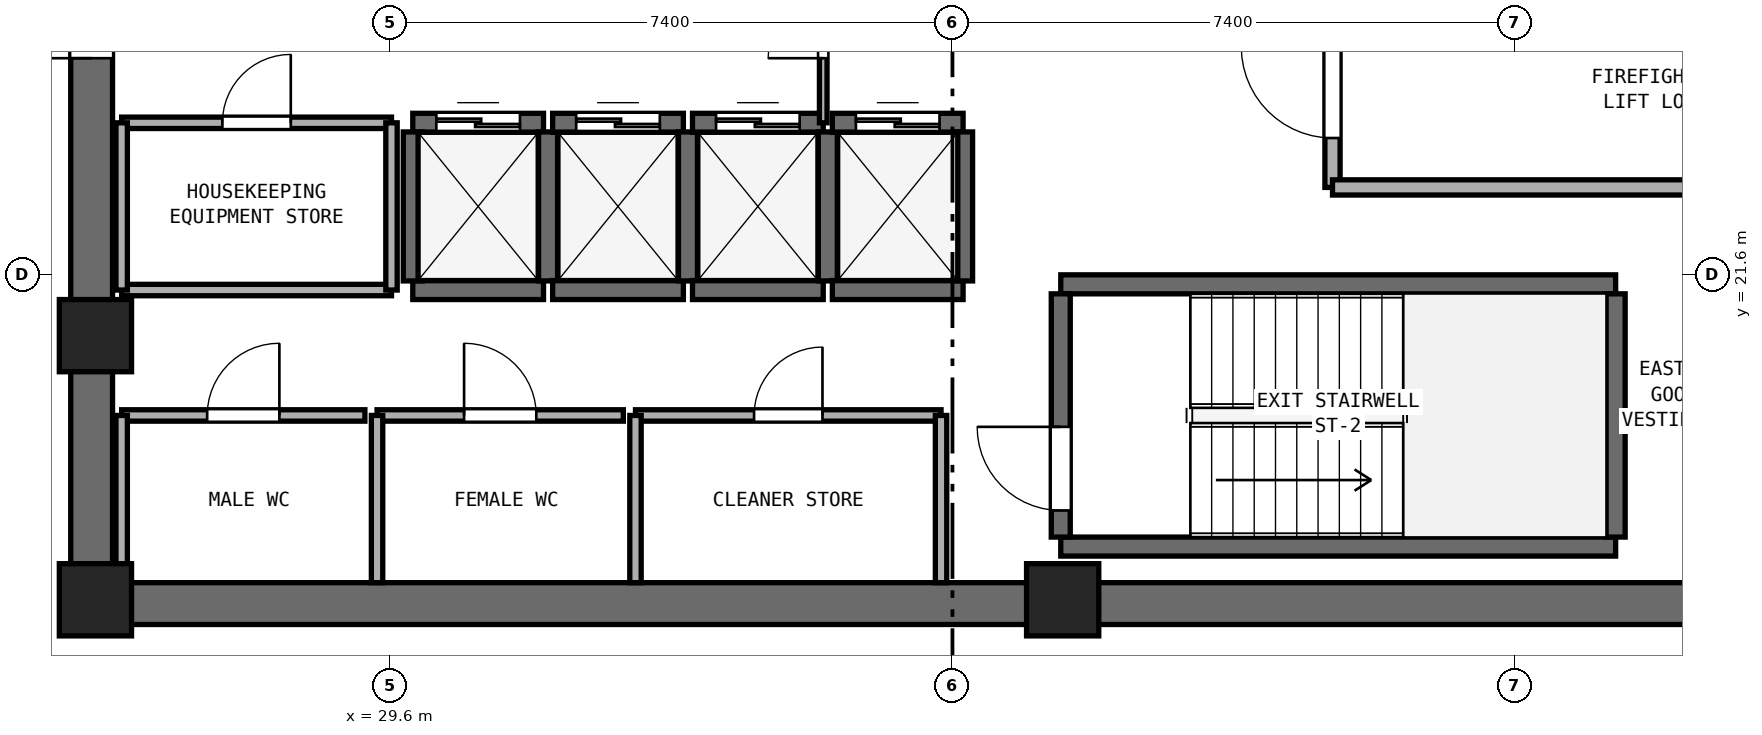
"""IFC4 building model, lengths in metres.
Left out: names, types, materials, properties, quantities, classifications, styles, units other than length and angle.
Written with IfcOpenShell. Run it as: python <this file> out.ifc"""

import sys

from ifc_helpers import new_model, si_unit, direction, frame, frame_2d, origin, origin_2d, place, context, subcontext, project, spatial, rectangle, extrude, element, fill, save


model = new_model("IFC4")
c1 = context("Model", 3, precision=1e-05, world=origin(), true_north=direction((0.0, 1.0)))
c2 = subcontext(c1, "Body", "Model", "MODEL_VIEW")
j1 = project(units=[si_unit("LENGTHUNIT", "METRE"), si_unit("PLANEANGLEUNIT", "RADIAN")], contexts=[c1])
p1 = place(None, origin())
s1 = spatial("IfcSite", under=j1, at=p1, CompositionType="ELEMENT")
p2 = place(p1, origin())
s2 = spatial("IfcBuilding", under=s1, at=p2, CompositionType="ELEMENT")
p3 = place(p2, frame((0.0, 0.0, 144.0)))
s3 = spatial("IfcBuildingStorey", under=s2, at=p3, CompositionType="ELEMENT", Elevation=144.0)
p4 = place(p3, frame((25.4, 17.275, 0.0), z_axis=(0.0, 0.0, 1.0), x_axis=(1.0, 0.0, 0.0)))
e1 = element("IfcWall", 1, at=p4, inside=s3, PredefinedType="SHEAR", context=c2, shape_type="SweptSolid", body=[
    extrude(rectangle(XDim=23.2, YDim=0.55, at=frame_2d((11.6, 0.0))), origin(), (0.0, 0.0, 1.0), 3.54),
])
p5 = place(p3, frame((25.675, 17.55, 0.0), z_axis=(0.0, 0.0, 1.0), x_axis=(0.0, 1.0, 0.0)))
e2 = element("IfcWall", 2, at=p5, inside=s3, PredefinedType="SHEAR", context=c2, shape_type="SweptSolid", body=[
    extrude(rectangle(XDim=15.3, YDim=0.55, at=frame_2d((7.65, 0.0))), origin(), (0.0, 0.0, 1.0), 3.54),
])
p6 = place(p5, frame((6.9, 0.0, 0.0)))
e3 = element("IfcOpeningElement", 3, at=p6, cuts=e2, PredefinedType="OPENING", context=c2, shape_type="SweptSolid", body=[
    extrude(rectangle(XDim=1.5, YDim=2.15, at=frame_2d((0.75, 1.075))), frame((0.0, 0.285, 0.0), z_axis=(0.0, -1.0, 0.0), x_axis=(1.0, 0.0, 0.0)), (0.0, 0.0, 1.0), 0.57),
])
for number, where, z_axis, x_axis in (
    (4, (25.725, 17.325, 0.0), (0.0, 0.0, 1.0), (1.0, 0.0, 0.0)),
    (5, (38.45, 17.325, 0.0), (0.0, 0.0, 1.0), (1.0, 0.0, 0.0)),
    (6, (25.725, 20.8, 0.0), (0.0, 0.0, 1.0), (1.0, 0.0, 0.0)),
):
    element("IfcColumn", number, at=place(p3, frame(where, z_axis=z_axis, x_axis=x_axis)), inside=s3, PredefinedType="PILASTER", context=c2, shape_type="SweptSolid", body=[
        extrude(rectangle(XDim=0.95, YDim=0.95, at=origin_2d()), origin(), (0.0, 0.0, 1.0), 3.8),
    ])
for number, where, z_axis, x_axis in (
    (7, (38.425, 18.025, 0.0), (0.0, 0.0, 1.0), (1.0, 0.0, 0.0)),
    (8, (38.425, 21.475, 0.0), (0.0, 0.0, 1.0), (1.0, 0.0, 0.0)),
):
    element("IfcWall", number, at=place(p3, frame(where, z_axis=z_axis, x_axis=x_axis)), inside=s3, PredefinedType="SHEAR", context=c2, shape_type="SweptSolid", body=[
        extrude(rectangle(XDim=7.3, YDim=0.25, at=frame_2d((3.65, 0.0))), origin(), (0.0, 0.0, 1.0), 3.54),
    ])
p7 = place(p3, frame((38.425, 18.15, 0.0), z_axis=(0.0, 0.0, 1.0), x_axis=(0.0, 1.0, 0.0)))
e9 = element("IfcWall", 9, at=p7, inside=s3, PredefinedType="SHEAR", context=c2, shape_type="SweptSolid", body=[
    extrude(rectangle(XDim=3.2, YDim=0.25, at=frame_2d((1.6, 0.0))), origin(), (0.0, 0.0, 1.0), 3.54),
])
p8 = place(p7, frame((0.35, 0.0, 0.0)))
e10 = element("IfcOpeningElement", 10, at=p8, cuts=e9, PredefinedType="OPENING", context=c2, shape_type="SweptSolid", body=[
    extrude(rectangle(XDim=1.1, YDim=2.15, at=frame_2d((0.55, 1.075))), frame((0.0, 0.135, 0.0), z_axis=(0.0, -1.0, 0.0), x_axis=(1.0, 0.0, 0.0)), (0.0, 0.0, 1.0), 0.27),
])
p9 = place(p3, frame((45.725, 18.15, 0.0), z_axis=(0.0, 0.0, 1.0), x_axis=(0.0, 1.0, 0.0)))
e11 = element("IfcWall", 11, at=p9, inside=s3, PredefinedType="SHEAR", context=c2, shape_type="SweptSolid", body=[
    extrude(rectangle(XDim=3.2, YDim=0.25, at=frame_2d((1.6, 0.0))), origin(), (0.0, 0.0, 1.0), 3.54),
])
p10 = place(p3, frame((29.9, 21.4, 0.0), z_axis=(0.0, 0.0, 1.0), x_axis=(1.0, 0.0, 0.0)))
e12 = element("IfcWall", 12, at=p10, inside=s3, PredefinedType="SHEAR", context=c2, shape_type="SweptSolid", body=[
    extrude(rectangle(XDim=1.72, YDim=0.25, at=frame_2d((0.86, 0.0))), origin(), (0.0, 0.0, 1.0), 3.54),
])
p11 = place(p3, frame((29.9, 23.6, 0.0), z_axis=(0.0, 0.0, 1.0), x_axis=(1.0, 0.0, 0.0)))
e13 = element("IfcWall", 13, at=p11, inside=s3, PredefinedType="SHEAR", context=c2, shape_type="SweptSolid", body=[
    extrude(rectangle(XDim=1.72, YDim=0.25, at=frame_2d((0.86, 0.0))), origin(), (0.0, 0.0, 1.0), 3.54),
])
p12 = place(p11, frame((0.31, 0.0, 0.0)))
e14 = element("IfcOpeningElement", 14, at=p12, cuts=e13, PredefinedType="OPENING", context=c2, shape_type="SweptSolid", body=[
    extrude(rectangle(XDim=1.1, YDim=2.15, at=frame_2d((0.55, 1.075))), frame((0.0, 0.135, 0.0), z_axis=(0.0, -1.0, 0.0), x_axis=(1.0, 0.0, 0.0)), (0.0, 0.0, 1.0), 0.27),
])
for number, where, z_axis, x_axis in (
    (15, (29.9, 21.52, 0.0), (0.0, 0.0, 1.0), (0.0, 1.0, 0.0)),
    (16, (31.68, 21.52, 0.0), (0.0, 0.0, 1.0), (0.0, 1.0, 0.0)),
):
    element("IfcWall", number, at=place(p3, frame(where, z_axis=z_axis, x_axis=x_axis)), inside=s3, PredefinedType="SHEAR", context=c2, shape_type="SweptSolid", body=[
        extrude(rectangle(XDim=1.96, YDim=0.25, at=frame_2d((0.98, 0.0))), origin(), (0.0, 0.0, 1.0), 3.54),
    ])
p13 = place(p3, frame((31.74, 21.4, 0.0), z_axis=(0.0, 0.0, 1.0), x_axis=(1.0, 0.0, 0.0)))
e17 = element("IfcWall", 17, at=p13, inside=s3, PredefinedType="SHEAR", context=c2, shape_type="SweptSolid", body=[
    extrude(rectangle(XDim=1.72, YDim=0.25, at=frame_2d((0.86, 0.0))), origin(), (0.0, 0.0, 1.0), 3.54),
])
p14 = place(p3, frame((31.74, 23.6, 0.0), z_axis=(0.0, 0.0, 1.0), x_axis=(1.0, 0.0, 0.0)))
e18 = element("IfcWall", 18, at=p14, inside=s3, PredefinedType="SHEAR", context=c2, shape_type="SweptSolid", body=[
    extrude(rectangle(XDim=1.72, YDim=0.25, at=frame_2d((0.86, 0.0))), origin(), (0.0, 0.0, 1.0), 3.54),
])
p15 = place(p14, frame((0.31, 0.0, 0.0)))
e19 = element("IfcOpeningElement", 19, at=p15, cuts=e18, PredefinedType="OPENING", context=c2, shape_type="SweptSolid", body=[
    extrude(rectangle(XDim=1.1, YDim=2.15, at=frame_2d((0.55, 1.075))), frame((0.0, 0.135, 0.0), z_axis=(0.0, -1.0, 0.0), x_axis=(1.0, 0.0, 0.0)), (0.0, 0.0, 1.0), 0.27),
])
p16 = place(p3, frame((33.52, 21.52, 0.0), z_axis=(0.0, 0.0, 1.0), x_axis=(0.0, 1.0, 0.0)))
e20 = element("IfcWall", 20, at=p16, inside=s3, PredefinedType="SHEAR", context=c2, shape_type="SweptSolid", body=[
    extrude(rectangle(XDim=1.96, YDim=0.25, at=frame_2d((0.98, 0.0))), origin(), (0.0, 0.0, 1.0), 3.54),
])
p17 = place(p3, frame((33.58, 21.4, 0.0), z_axis=(0.0, 0.0, 1.0), x_axis=(1.0, 0.0, 0.0)))
e21 = element("IfcWall", 21, at=p17, inside=s3, PredefinedType="SHEAR", context=c2, shape_type="SweptSolid", body=[
    extrude(rectangle(XDim=1.72, YDim=0.25, at=frame_2d((0.86, 0.0))), origin(), (0.0, 0.0, 1.0), 3.54),
])
p18 = place(p3, frame((33.58, 23.6, 0.0), z_axis=(0.0, 0.0, 1.0), x_axis=(1.0, 0.0, 0.0)))
e22 = element("IfcWall", 22, at=p18, inside=s3, PredefinedType="SHEAR", context=c2, shape_type="SweptSolid", body=[
    extrude(rectangle(XDim=1.72, YDim=0.25, at=frame_2d((0.86, 0.0))), origin(), (0.0, 0.0, 1.0), 3.54),
])
p19 = place(p18, frame((0.31, 0.0, 0.0)))
e23 = element("IfcOpeningElement", 23, at=p19, cuts=e22, PredefinedType="OPENING", context=c2, shape_type="SweptSolid", body=[
    extrude(rectangle(XDim=1.1, YDim=2.15, at=frame_2d((0.55, 1.075))), frame((0.0, 0.135, 0.0), z_axis=(0.0, -1.0, 0.0), x_axis=(1.0, 0.0, 0.0)), (0.0, 0.0, 1.0), 0.27),
])
p20 = place(p3, frame((35.36, 21.52, 0.0), z_axis=(0.0, 0.0, 1.0), x_axis=(0.0, 1.0, 0.0)))
e24 = element("IfcWall", 24, at=p20, inside=s3, PredefinedType="SHEAR", context=c2, shape_type="SweptSolid", body=[
    extrude(rectangle(XDim=1.96, YDim=0.25, at=frame_2d((0.98, 0.0))), origin(), (0.0, 0.0, 1.0), 3.54),
])
p21 = place(p3, frame((35.42, 21.4, 0.0), z_axis=(0.0, 0.0, 1.0), x_axis=(1.0, 0.0, 0.0)))
e25 = element("IfcWall", 25, at=p21, inside=s3, PredefinedType="SHEAR", context=c2, shape_type="SweptSolid", body=[
    extrude(rectangle(XDim=1.72, YDim=0.25, at=frame_2d((0.86, 0.0))), origin(), (0.0, 0.0, 1.0), 3.54),
])
p22 = place(p3, frame((35.42, 23.6, 0.0), z_axis=(0.0, 0.0, 1.0), x_axis=(1.0, 0.0, 0.0)))
e26 = element("IfcWall", 26, at=p22, inside=s3, PredefinedType="SHEAR", context=c2, shape_type="SweptSolid", body=[
    extrude(rectangle(XDim=1.72, YDim=0.25, at=frame_2d((0.86, 0.0))), origin(), (0.0, 0.0, 1.0), 3.54),
])
p23 = place(p22, frame((0.31, 0.0, 0.0)))
e27 = element("IfcOpeningElement", 27, at=p23, cuts=e26, PredefinedType="OPENING", context=c2, shape_type="SweptSolid", body=[
    extrude(rectangle(XDim=1.1, YDim=2.15, at=frame_2d((0.55, 1.075))), frame((0.0, 0.135, 0.0), z_axis=(0.0, -1.0, 0.0), x_axis=(1.0, 0.0, 0.0)), (0.0, 0.0, 1.0), 0.27),
])
p24 = place(p3, frame((37.14, 21.52, 0.0), z_axis=(0.0, 0.0, 1.0), x_axis=(0.0, 1.0, 0.0)))
e28 = element("IfcWall", 28, at=p24, inside=s3, PredefinedType="SHEAR", context=c2, shape_type="SweptSolid", body=[
    extrude(rectangle(XDim=1.96, YDim=0.25, at=frame_2d((0.98, 0.0))), origin(), (0.0, 0.0, 1.0), 3.54),
])
p25 = place(p3, frame((42.0, 22.75, 0.0), z_axis=(0.0, 0.0, 1.0), x_axis=(0.0, 1.0, 0.0)))
e29 = element("IfcWall", 29, at=p25, inside=s3, PredefinedType="SOLIDWALL", context=c2, shape_type="SweptSolid", body=[
    extrude(rectangle(XDim=6.05, YDim=0.2, at=frame_2d((3.025, 0.0))), origin(), (0.0, 0.0, 1.0), 3.54),
])
p26 = place(p25, frame((0.65, 0.0, 0.0)))
e30 = element("IfcOpeningElement", 30, at=p26, cuts=e29, PredefinedType="OPENING", context=c2, shape_type="SweptSolid", body=[
    extrude(rectangle(XDim=1.2, YDim=2.15, at=frame_2d((0.6, 1.075))), frame((0.0, 0.11, 0.0), z_axis=(0.0, -1.0, 0.0), x_axis=(1.0, 0.0, 0.0)), (0.0, 0.0, 1.0), 0.22),
])
p27 = place(p3, frame((42.0, 22.75, 0.0), z_axis=(0.0, 0.0, 1.0), x_axis=(1.0, 0.0, 0.0)))
e31 = element("IfcWall", 31, at=p27, inside=s3, PredefinedType="SOLIDWALL", context=c2, shape_type="SweptSolid", body=[
    extrude(rectangle(XDim=6.05, YDim=0.2, at=frame_2d((3.025, 0.0))), origin(), (0.0, 0.0, 1.0), 3.54),
])
p28 = place(p3, frame((26.07, 19.75, 0.0), z_axis=(0.0, 0.0, 1.0), x_axis=(1.0, 0.0, 0.0)))
e32 = element("IfcWall", 32, at=p28, inside=s3, PredefinedType="PARTITIONING", context=c2, shape_type="SweptSolid", body=[
    extrude(rectangle(XDim=3.2, YDim=0.15, at=frame_2d((1.6, 0.0))), origin(), (0.0, 0.0, 1.0), 3.54),
])
p29 = place(p28, frame((1.125, 0.0, 0.0)))
e33 = element("IfcOpeningElement", 33, at=p29, cuts=e32, PredefinedType="OPENING", context=c2, shape_type="SweptSolid", body=[
    extrude(rectangle(XDim=0.95, YDim=2.1, at=frame_2d((0.475, 1.05))), frame((0.0, 0.085, 0.0), z_axis=(0.0, -1.0, 0.0), x_axis=(1.0, 0.0, 0.0)), (0.0, 0.0, 1.0), 0.17),
])
p30 = place(p3, frame((26.07, 17.55, 0.0), z_axis=(0.0, 0.0, 1.0), x_axis=(0.0, 1.0, 0.0)))
e34 = element("IfcWall", 34, at=p30, inside=s3, PredefinedType="PARTITIONING", context=c2, shape_type="SweptSolid", body=[
    extrude(rectangle(XDim=2.2, YDim=0.15, at=frame_2d((1.1, 0.0))), origin(), (0.0, 0.0, 1.0), 2.64),
])
p31 = place(p3, frame((29.43, 19.75, 0.0), z_axis=(0.0, 0.0, 1.0), x_axis=(1.0, 0.0, 0.0)))
e35 = element("IfcWall", 35, at=p31, inside=s3, PredefinedType="PARTITIONING", context=c2, shape_type="SweptSolid", body=[
    extrude(rectangle(XDim=3.24, YDim=0.15, at=frame_2d((1.62, 0.0))), origin(), (0.0, 0.0, 1.0), 3.54),
])
p32 = place(p31, frame((1.145, 0.0, 0.0)))
e36 = element("IfcOpeningElement", 36, at=p32, cuts=e35, PredefinedType="OPENING", context=c2, shape_type="SweptSolid", body=[
    extrude(rectangle(XDim=0.95, YDim=2.1, at=frame_2d((0.475, 1.05))), frame((0.0, 0.085, 0.0), z_axis=(0.0, -1.0, 0.0), x_axis=(1.0, 0.0, 0.0)), (0.0, 0.0, 1.0), 0.17),
])
p33 = place(p3, frame((29.43, 17.55, 0.0), z_axis=(0.0, 0.0, 1.0), x_axis=(0.0, 1.0, 0.0)))
e37 = element("IfcWall", 37, at=p33, inside=s3, PredefinedType="PARTITIONING", context=c2, shape_type="SweptSolid", body=[
    extrude(rectangle(XDim=2.2, YDim=0.15, at=frame_2d((1.1, 0.0))), origin(), (0.0, 0.0, 1.0), 3.54),
])
p34 = place(p3, frame((32.83, 19.75, 0.0), z_axis=(0.0, 0.0, 1.0), x_axis=(1.0, 0.0, 0.0)))
e38 = element("IfcWall", 38, at=p34, inside=s3, PredefinedType="PARTITIONING", context=c2, shape_type="SweptSolid", body=[
    extrude(rectangle(XDim=4.02, YDim=0.15, at=frame_2d((2.01, 0.0))), origin(), (0.0, 0.0, 1.0), 3.54),
])
p35 = place(p34, frame((1.56, 0.0, 0.0)))
e39 = element("IfcOpeningElement", 39, at=p35, cuts=e38, PredefinedType="OPENING", context=c2, shape_type="SweptSolid", body=[
    extrude(rectangle(XDim=0.9, YDim=2.1, at=frame_2d((0.45, 1.05))), frame((0.0, 0.085, 0.0), z_axis=(0.0, -1.0, 0.0), x_axis=(1.0, 0.0, 0.0)), (0.0, 0.0, 1.0), 0.17),
])
for number, where, z_axis, x_axis in (
    (40, (32.83, 17.55, 0.0), (0.0, 0.0, 1.0), (0.0, 1.0, 0.0)),
    (41, (36.85, 17.55, 0.0), (0.0, 0.0, 1.0), (0.0, 1.0, 0.0)),
):
    element("IfcWall", number, at=place(p3, frame(where, z_axis=z_axis, x_axis=x_axis)), inside=s3, PredefinedType="PARTITIONING", context=c2, shape_type="SweptSolid", body=[
        extrude(rectangle(XDim=2.2, YDim=0.15, at=frame_2d((1.1, 0.0))), origin(), (0.0, 0.0, 1.0), 3.54),
    ])
p36 = place(p3, frame((26.07, 21.4, 0.0), z_axis=(0.0, 0.0, 1.0), x_axis=(1.0, 0.0, 0.0)))
e42 = element("IfcWall", 42, at=p36, inside=s3, PredefinedType="PARTITIONING", context=c2, shape_type="SweptSolid", body=[
    extrude(rectangle(XDim=3.55, YDim=0.15, at=frame_2d((1.775, 0.0))), origin(), (0.0, 0.0, 1.0), 3.54),
])
p37 = place(p3, frame((26.07, 23.6, 0.0), z_axis=(0.0, 0.0, 1.0), x_axis=(1.0, 0.0, 0.0)))
e43 = element("IfcWall", 43, at=p37, inside=s3, PredefinedType="PARTITIONING", context=c2, shape_type="SweptSolid", body=[
    extrude(rectangle(XDim=3.55, YDim=0.15, at=frame_2d((1.775, 0.0))), origin(), (0.0, 0.0, 1.0), 3.54),
])
p38 = place(p37, frame((1.325, 0.0, 0.0)))
e44 = element("IfcOpeningElement", 44, at=p38, cuts=e43, PredefinedType="OPENING", context=c2, shape_type="SweptSolid", body=[
    extrude(rectangle(XDim=0.9, YDim=2.1, at=frame_2d((0.45, 1.05))), frame((0.0, 0.085, 0.0), z_axis=(0.0, -1.0, 0.0), x_axis=(1.0, 0.0, 0.0)), (0.0, 0.0, 1.0), 0.17),
])
p39 = place(p3, frame((26.07, 21.4, 0.0), z_axis=(0.0, 0.0, 1.0), x_axis=(0.0, 1.0, 0.0)))
e45 = element("IfcWall", 45, at=p39, inside=s3, PredefinedType="PARTITIONING", context=c2, shape_type="SweptSolid", body=[
    extrude(rectangle(XDim=2.2, YDim=0.15, at=frame_2d((1.1, 0.0))), origin(), (0.0, 0.0, 1.0), 2.64),
])
p40 = place(p3, frame((29.62, 21.4, 0.0), z_axis=(0.0, 0.0, 1.0), x_axis=(0.0, 1.0, 0.0)))
e46 = element("IfcWall", 46, at=p40, inside=s3, PredefinedType="PARTITIONING", context=c2, shape_type="SweptSolid", body=[
    extrude(rectangle(XDim=2.2, YDim=0.15, at=frame_2d((1.1, 0.0))), origin(), (0.0, 0.0, 1.0), 3.54),
])
p41 = place(p3, frame((35.3, 23.6, 0.0), z_axis=(0.0, 0.0, 1.0), x_axis=(0.0, 1.0, 0.0)))
e47 = element("IfcWall", 47, at=p41, inside=s3, PredefinedType="PARTITIONING", context=c2, shape_type="SweptSolid", body=[
    extrude(rectangle(XDim=3.2, YDim=0.1, at=frame_2d((1.6, 0.0))), origin(), (0.0, 0.0, 1.0), 3.54),
])
p42 = place(p41, frame((0.85, 0.0, 0.0)))
e48 = element("IfcOpeningElement", 48, at=p42, cuts=e47, PredefinedType="OPENING", context=c2, shape_type="SweptSolid", body=[
    extrude(rectangle(XDim=1.45, YDim=2.12, at=frame_2d((0.725, 1.06))), frame((0.0, 0.06, 0.0), z_axis=(0.0, -1.0, 0.0), x_axis=(1.0, 0.0, 0.0)), (0.0, 0.0, 1.0), 0.12),
])
p43 = place(p8, origin())
e49 = element("IfcDoor", 49, at=p43, inside=s3, OperationType="SINGLE_SWING_RIGHT", PredefinedType="DOOR", context=c2, shape_type="SweptSolid", body=[
    extrude(rectangle(XDim=1.1, YDim=2.15, at=frame_2d((0.55, 1.075))), frame((0.0, 0.025, 0.0), z_axis=(0.0, -1.0, 0.0), x_axis=(1.0, 0.0, 0.0)), (0.0, 0.0, 1.0), 0.05),
])
fill(e10, e49)
p44 = place(p12, origin())
e50 = element("IfcDoor", 50, at=p44, inside=s3, OperationType="DOUBLE_DOOR_SLIDING", PredefinedType="DOOR", context=c2, shape_type="SweptSolid", body=[
    extrude(rectangle(XDim=1.1, YDim=2.15, at=frame_2d((0.55, 1.075))), frame((0.0, 0.025, 0.0), z_axis=(0.0, -1.0, 0.0), x_axis=(1.0, 0.0, 0.0)), (0.0, 0.0, 1.0), 0.05),
])
fill(e14, e50)
p45 = place(p15, origin())
e51 = element("IfcDoor", 51, at=p45, inside=s3, OperationType="DOUBLE_DOOR_SLIDING", PredefinedType="DOOR", context=c2, shape_type="SweptSolid", body=[
    extrude(rectangle(XDim=1.1, YDim=2.15, at=frame_2d((0.55, 1.075))), frame((0.0, 0.025, 0.0), z_axis=(0.0, -1.0, 0.0), x_axis=(1.0, 0.0, 0.0)), (0.0, 0.0, 1.0), 0.05),
])
fill(e19, e51)
p46 = place(p19, origin())
e52 = element("IfcDoor", 52, at=p46, inside=s3, OperationType="DOUBLE_DOOR_SLIDING", PredefinedType="DOOR", context=c2, shape_type="SweptSolid", body=[
    extrude(rectangle(XDim=1.1, YDim=2.15, at=frame_2d((0.55, 1.075))), frame((0.0, 0.025, 0.0), z_axis=(0.0, -1.0, 0.0), x_axis=(1.0, 0.0, 0.0)), (0.0, 0.0, 1.0), 0.05),
])
fill(e23, e52)
p47 = place(p23, origin())
e53 = element("IfcDoor", 53, at=p47, inside=s3, OperationType="DOUBLE_DOOR_SLIDING", PredefinedType="DOOR", context=c2, shape_type="SweptSolid", body=[
    extrude(rectangle(XDim=1.1, YDim=2.15, at=frame_2d((0.55, 1.075))), frame((0.0, 0.025, 0.0), z_axis=(0.0, -1.0, 0.0), x_axis=(1.0, 0.0, 0.0)), (0.0, 0.0, 1.0), 0.05),
])
fill(e27, e53)
p48 = place(p26, origin())
e54 = element("IfcDoor", 54, at=p48, inside=s3, OperationType="SINGLE_SWING_RIGHT", PredefinedType="DOOR", context=c2, shape_type="SweptSolid", body=[
    extrude(rectangle(XDim=1.2, YDim=2.15, at=frame_2d((0.6, 1.075))), frame((0.0, 0.025, 0.0), z_axis=(0.0, -1.0, 0.0), x_axis=(1.0, 0.0, 0.0)), (0.0, 0.0, 1.0), 0.05),
])
fill(e30, e54)
p49 = place(p6, origin())
e55 = element("IfcDoor", 55, at=p49, inside=s3, OperationType="DOUBLE_DOOR_SINGLE_SWING", PredefinedType="DOOR", context=c2, shape_type="SweptSolid", body=[
    extrude(rectangle(XDim=1.5, YDim=2.15, at=frame_2d((0.75, 1.075))), frame((0.0, 0.025, 0.0), z_axis=(0.0, -1.0, 0.0), x_axis=(1.0, 0.0, 0.0)), (0.0, 0.0, 1.0), 0.05),
])
fill(e3, e55)
p50 = place(p29, origin())
e56 = element("IfcDoor", 56, at=p50, inside=s3, OperationType="SINGLE_SWING_RIGHT", PredefinedType="DOOR", context=c2, shape_type="SweptSolid", body=[
    extrude(rectangle(XDim=0.95, YDim=2.1, at=frame_2d((0.475, 1.05))), frame((0.0, 0.025, 0.0), z_axis=(0.0, -1.0, 0.0), x_axis=(1.0, 0.0, 0.0)), (0.0, 0.0, 1.0), 0.05),
])
fill(e33, e56)
p51 = place(p32, origin())
e57 = element("IfcDoor", 57, at=p51, inside=s3, OperationType="SINGLE_SWING_LEFT", PredefinedType="DOOR", context=c2, shape_type="SweptSolid", body=[
    extrude(rectangle(XDim=0.95, YDim=2.1, at=frame_2d((0.475, 1.05))), frame((0.0, 0.025, 0.0), z_axis=(0.0, -1.0, 0.0), x_axis=(1.0, 0.0, 0.0)), (0.0, 0.0, 1.0), 0.05),
])
fill(e36, e57)
p52 = place(p35, origin())
e58 = element("IfcDoor", 58, at=p52, inside=s3, OperationType="SINGLE_SWING_RIGHT", PredefinedType="DOOR", context=c2, shape_type="SweptSolid", body=[
    extrude(rectangle(XDim=0.9, YDim=2.1, at=frame_2d((0.45, 1.05))), frame((0.0, 0.025, 0.0), z_axis=(0.0, -1.0, 0.0), x_axis=(1.0, 0.0, 0.0)), (0.0, 0.0, 1.0), 0.05),
])
fill(e39, e58)
p53 = place(p38, origin())
e59 = element("IfcDoor", 59, at=p53, inside=s3, OperationType="SINGLE_SWING_RIGHT", PredefinedType="DOOR", context=c2, shape_type="SweptSolid", body=[
    extrude(rectangle(XDim=0.9, YDim=2.1, at=frame_2d((0.45, 1.05))), frame((0.0, 0.025, 0.0), z_axis=(0.0, -1.0, 0.0), x_axis=(1.0, 0.0, 0.0)), (0.0, 0.0, 1.0), 0.05),
])
fill(e44, e59)
p54 = place(p42, origin())
e60 = element("IfcDoor", 60, at=p54, inside=s3, OperationType="DOUBLE_DOOR_SINGLE_SWING", PredefinedType="DOOR", context=c2, shape_type="SweptSolid", body=[
    extrude(rectangle(XDim=1.45, YDim=2.12, at=frame_2d((0.725, 1.06))), frame((0.0, 0.025, 0.0), z_axis=(0.0, -1.0, 0.0), x_axis=(1.0, 0.0, 0.0)), (0.0, 0.0, 1.0), 0.05),
])
fill(e48, e60)
save(model, sys.argv[1])
